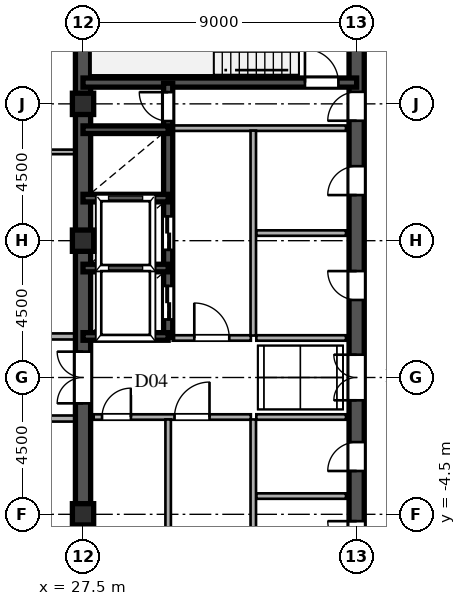
"""IFC4 building model, lengths in metres.
Left out: names, types, materials, properties, quantities, classifications, styles, units other than length and angle.
Written with IfcOpenShell. Run it as: python <this file> out.ifc"""

import sys

from ifc_helpers import new_model, si_unit, direction, frame, frame_2d, origin, origin_2d, place, context, subcontext, project, spatial, rectangle, hollow_rectangle, extrude, source, transform, mapped, element, fill, save


model = new_model("IFC4")
c1 = context("Model", 3, precision=1e-05, world=origin(), true_north=direction((0.0, 1.0)))
c2 = subcontext(c1, "Body", "Model", "MODEL_VIEW")
j1 = project(units=[si_unit("LENGTHUNIT", "METRE"), si_unit("PLANEANGLEUNIT", "RADIAN")], contexts=[c1])
p1 = place(None, origin())
s1 = spatial("IfcSite", under=j1, at=p1, CompositionType="ELEMENT")
p2 = place(p1, origin())
s2 = spatial("IfcBuilding", under=s1, at=p2, CompositionType="ELEMENT")
p3 = place(p2, frame((0.0, 0.0, 239.4)))
s3 = spatial("IfcBuildingStorey", under=s2, at=p3, CompositionType="ELEMENT", Elevation=239.4)
m1 = source(origin(), c2, "Body", "SweptSolid", [
    extrude(hollow_rectangle(XDim=0.7, YDim=0.7, WallThickness=0.03, at=origin_2d()), origin(), (0.0, 0.0, 1.0), 3.75),
])
for number, where, z_axis, x_axis in (
    (1, (27.5, -4.5, 0.0), (0.0, 0.0, 1.0), (1.0, 0.0, 0.0)),
    (2, (27.5, 4.5, 0.0), (0.0, 0.0, 1.0), (1.0, 0.0, 0.0)),
    (3, (27.5, 9.0, 0.0), (0.0, 0.0, 1.0), (1.0, 0.0, 0.0)),
):
    element("IfcColumn", number, at=place(p3, frame(where, z_axis=z_axis, x_axis=x_axis)), inside=s3, PredefinedType="COLUMN", context=c2, shape_type="MappedRepresentation", body=[
        mapped(m1, transform((0.0, 0.0, 0.0), scale=1.0)),
    ])
for number, where, z_axis, x_axis in (
    (4, (27.5, -13.5, 0.0), (0.0, 0.0, 1.0), (0.0, 1.0, 0.0)),
    (5, (27.5, 1.3, 0.0), (0.0, 0.0, 1.0), (0.0, 1.0, 0.0)),
):
    element("IfcWall", number, at=place(p3, frame(where, z_axis=z_axis, x_axis=x_axis)), inside=s3, PredefinedType="SHEAR", context=c2, shape_type="SweptSolid", body=[
        extrude(rectangle(XDim=12.2, YDim=0.5, at=frame_2d((6.1, 0.0))), origin(), (0.0, 0.0, 1.0), 3.53),
    ])
p4 = place(p3, frame((27.5, -1.3, 0.0), z_axis=(0.0, 0.0, 1.0), x_axis=(0.0, 1.0, 0.0)))
e6 = element("IfcWall", 6, at=p4, inside=s3, PredefinedType="SHEAR", context=c2, shape_type="SweptSolid", body=[
    extrude(rectangle(XDim=2.6, YDim=0.5, at=frame_2d((1.3, 0.0))), origin(), (0.0, 0.0, 1.0), 3.53),
])
p5 = place(p4, frame((0.45, 0.0, 0.0)))
e7 = element("IfcOpeningElement", 7, at=p5, cuts=e6, PredefinedType="OPENING", context=c2, shape_type="SweptSolid", body=[
    extrude(rectangle(XDim=1.7, YDim=2.35, at=frame_2d((0.85, 1.175))), frame((0.0, 0.26, 0.0), z_axis=(0.0, -1.0, 0.0), x_axis=(1.0, 0.0, 0.0)), (0.0, 0.0, 1.0), 0.52),
])
p6 = place(p3, frame((36.5, -1.3, 0.0), z_axis=(0.0, 0.0, 1.0), x_axis=(0.0, 1.0, 0.0)))
e8 = element("IfcWall", 8, at=p6, inside=s3, PredefinedType="SHEAR", context=c2, shape_type="SweptSolid", body=[
    extrude(rectangle(XDim=2.6, YDim=0.5, at=frame_2d((1.3, 0.0))), origin(), (0.0, 0.0, 1.0), 3.53),
])
p7 = place(p6, frame((0.55, 0.0, 0.0)))
e9 = element("IfcOpeningElement", 9, at=p7, cuts=e8, PredefinedType="OPENING", context=c2, shape_type="SweptSolid", body=[
    extrude(rectangle(XDim=1.5, YDim=2.3, at=frame_2d((0.75, 1.15))), frame((0.0, 0.26, 0.0), z_axis=(0.0, -1.0, 0.0), x_axis=(1.0, 0.0, 0.0)), (0.0, 0.0, 1.0), 0.52),
])
p8 = place(p3, frame((36.5, 8.2, 0.0), z_axis=(0.0, 0.0, 1.0), x_axis=(0.0, 1.0, 0.0)))
e10 = element("IfcWall", 10, at=p8, inside=s3, PredefinedType="SHEAR", context=c2, shape_type="SweptSolid", body=[
    extrude(rectangle(XDim=5.45, YDim=0.5, at=frame_2d((2.725, 0.0))), origin(), (0.0, 0.0, 1.0), 3.53),
])
p9 = place(p8, frame((0.245, 0.0, 0.0)))
e11 = element("IfcOpeningElement", 11, at=p9, cuts=e10, PredefinedType="OPENING", context=c2, shape_type="SweptSolid", body=[
    extrude(rectangle(XDim=0.95, YDim=2.15, at=frame_2d((0.475, 1.075))), frame((0.0, 0.26, 0.0), z_axis=(0.0, -1.0, 0.0), x_axis=(1.0, 0.0, 0.0)), (0.0, 0.0, 1.0), 0.52),
])
p10 = place(p3, frame((36.5, -6.5, 0.0), z_axis=(0.0, 0.0, 1.0), x_axis=(0.0, 1.0, 0.0)))
e12 = element("IfcWall", 12, at=p10, inside=s3, PredefinedType="SHEAR", context=c2, shape_type="SweptSolid", body=[
    extrude(rectangle(XDim=2.6, YDim=0.5, at=frame_2d((1.3, 0.0))), origin(), (0.0, 0.0, 1.0), 3.53),
])
p11 = place(p10, frame((0.825, 0.0, 0.0)))
e13 = element("IfcOpeningElement", 13, at=p11, cuts=e12, PredefinedType="OPENING", context=c2, shape_type="SweptSolid", body=[
    extrude(rectangle(XDim=0.95, YDim=2.15, at=frame_2d((0.475, 1.075))), frame((0.0, 0.26, 0.0), z_axis=(0.0, -1.0, 0.0), x_axis=(1.0, 0.0, 0.0)), (0.0, 0.0, 1.0), 0.52),
])
p12 = place(p3, frame((36.5, -3.9, 0.0), z_axis=(0.0, 0.0, 1.0), x_axis=(0.0, 1.0, 0.0)))
e14 = element("IfcWall", 14, at=p12, inside=s3, PredefinedType="SHEAR", context=c2, shape_type="SweptSolid", body=[
    extrude(rectangle(XDim=2.6, YDim=0.5, at=frame_2d((1.3, 0.0))), origin(), (0.0, 0.0, 1.0), 3.53),
])
p13 = place(p12, frame((0.825, 0.0, 0.0)))
e15 = element("IfcOpeningElement", 15, at=p13, cuts=e14, PredefinedType="OPENING", context=c2, shape_type="SweptSolid", body=[
    extrude(rectangle(XDim=0.95, YDim=2.15, at=frame_2d((0.475, 1.075))), frame((0.0, 0.26, 0.0), z_axis=(0.0, -1.0, 0.0), x_axis=(1.0, 0.0, 0.0)), (0.0, 0.0, 1.0), 0.52),
])
p14 = place(p3, frame((36.5, 1.3, 0.0), z_axis=(0.0, 0.0, 1.0), x_axis=(0.0, 1.0, 0.0)))
e16 = element("IfcWall", 16, at=p14, inside=s3, PredefinedType="SHEAR", context=c2, shape_type="SweptSolid", body=[
    extrude(rectangle(XDim=3.45, YDim=0.5, at=frame_2d((1.725, 0.0))), origin(), (0.0, 0.0, 1.0), 3.53),
])
p15 = place(p14, frame((1.25, 0.0, 0.0)))
e17 = element("IfcOpeningElement", 17, at=p15, cuts=e16, PredefinedType="OPENING", context=c2, shape_type="SweptSolid", body=[
    extrude(rectangle(XDim=0.95, YDim=2.15, at=frame_2d((0.475, 1.075))), frame((0.0, 0.26, 0.0), z_axis=(0.0, -1.0, 0.0), x_axis=(1.0, 0.0, 0.0)), (0.0, 0.0, 1.0), 0.52),
])
p16 = place(p3, frame((36.5, 4.75, 0.0), z_axis=(0.0, 0.0, 1.0), x_axis=(0.0, 1.0, 0.0)))
e18 = element("IfcWall", 18, at=p16, inside=s3, PredefinedType="SHEAR", context=c2, shape_type="SweptSolid", body=[
    extrude(rectangle(XDim=3.45, YDim=0.5, at=frame_2d((1.725, 0.0))), origin(), (0.0, 0.0, 1.0), 3.53),
])
p17 = place(p16, frame((1.25, 0.0, 0.0)))
e19 = element("IfcOpeningElement", 19, at=p17, cuts=e18, PredefinedType="OPENING", context=c2, shape_type="SweptSolid", body=[
    extrude(rectangle(XDim=0.95, YDim=2.15, at=frame_2d((0.475, 1.075))), frame((0.0, 0.26, 0.0), z_axis=(0.0, -1.0, 0.0), x_axis=(1.0, 0.0, 0.0)), (0.0, 0.0, 1.0), 0.52),
])
p18 = place(p3, frame((27.5, 9.7, 0.0), z_axis=(0.0, 0.0, 1.0), x_axis=(1.0, 0.0, 0.0)))
e20 = element("IfcWall", 20, at=p18, inside=s3, PredefinedType="SHEAR", context=c2, shape_type="SweptSolid", body=[
    extrude(rectangle(XDim=9.0, YDim=0.3, at=frame_2d((4.5, 0.0))), origin(), (0.0, 0.0, 1.0), 3.53),
])
p19 = place(p18, frame((7.3, 0.0, 0.0)))
e21 = element("IfcOpeningElement", 21, at=p19, cuts=e20, PredefinedType="OPENING", context=c2, shape_type="SweptSolid", body=[
    extrude(rectangle(XDim=1.1, YDim=2.2, at=frame_2d((0.55, 1.1))), frame((0.0, 0.16, 0.0), z_axis=(0.0, -1.0, 0.0), x_axis=(1.0, 0.0, 0.0)), (0.0, 0.0, 1.0), 0.32),
])
for number, where, z_axis, x_axis in (
    (22, (27.5, 1.35, 0.0), (0.0, 0.0, 1.0), (1.0, 0.0, 0.0)),
    (23, (27.5, 3.6, 0.0), (0.0, 0.0, 1.0), (1.0, 0.0, 0.0)),
    (24, (27.5, 5.9, 0.0), (0.0, 0.0, 1.0), (1.0, 0.0, 0.0)),
    (25, (27.5, 8.15, 0.0), (0.0, 0.0, 1.0), (1.0, 0.0, 0.0)),
):
    element("IfcWall", number, at=place(p3, frame(where, z_axis=z_axis, x_axis=x_axis)), inside=s3, PredefinedType="SHEAR", context=c2, shape_type="SweptSolid", body=[
        extrude(rectangle(XDim=2.8, YDim=0.25, at=frame_2d((1.4, 0.0))), origin(), (0.0, 0.0, 1.0), 3.53),
    ])
p20 = place(p3, frame((30.3, 1.32, 0.0), z_axis=(0.0, 0.0, 1.0), x_axis=(0.0, 1.0, 0.0)))
e26 = element("IfcWall", 26, at=p20, inside=s3, PredefinedType="SHEAR", context=c2, shape_type="SweptSolid", body=[
    extrude(rectangle(XDim=2.28, YDim=0.3, at=frame_2d((1.14, 0.0))), origin(), (0.0, 0.0, 1.0), 3.53),
])
p21 = place(p20, frame((0.59, 0.0, 0.0)))
e27 = element("IfcOpeningElement", 27, at=p21, cuts=e26, PredefinedType="OPENING", context=c2, shape_type="SweptSolid", body=[
    extrude(rectangle(XDim=1.1, YDim=2.2, at=frame_2d((0.55, 1.1))), frame((0.0, 0.16, 0.0), z_axis=(0.0, -1.0, 0.0), x_axis=(1.0, 0.0, 0.0)), (0.0, 0.0, 1.0), 0.32),
])
p22 = place(p3, frame((30.3, 3.6, 0.0), z_axis=(0.0, 0.0, 1.0), x_axis=(0.0, 1.0, 0.0)))
e28 = element("IfcWall", 28, at=p22, inside=s3, PredefinedType="SHEAR", context=c2, shape_type="SweptSolid", body=[
    extrude(rectangle(XDim=2.3, YDim=0.3, at=frame_2d((1.15, 0.0))), origin(), (0.0, 0.0, 1.0), 3.53),
])
p23 = place(p22, frame((0.6, 0.0, 0.0)))
e29 = element("IfcOpeningElement", 29, at=p23, cuts=e28, PredefinedType="OPENING", context=c2, shape_type="SweptSolid", body=[
    extrude(rectangle(XDim=1.1, YDim=2.2, at=frame_2d((0.55, 1.1))), frame((0.0, 0.16, 0.0), z_axis=(0.0, -1.0, 0.0), x_axis=(1.0, 0.0, 0.0)), (0.0, 0.0, 1.0), 0.32),
])
p24 = place(p3, frame((30.3, 5.9, 0.0), z_axis=(0.0, 0.0, 1.0), x_axis=(0.0, 1.0, 0.0)))
e30 = element("IfcWall", 30, at=p24, inside=s3, PredefinedType="SHEAR", context=c2, shape_type="SweptSolid", body=[
    extrude(rectangle(XDim=2.25, YDim=0.3, at=frame_2d((1.125, 0.0))), origin(), (0.0, 0.0, 1.0), 3.53),
])
p25 = place(p3, frame((30.3, 8.15, 0.0), z_axis=(0.0, 0.0, 1.0), x_axis=(0.0, 1.0, 0.0)))
e31 = element("IfcWall", 31, at=p25, inside=s3, PredefinedType="SHEAR", context=c2, shape_type="SweptSolid", body=[
    extrude(rectangle(XDim=1.53, YDim=0.3, at=frame_2d((0.765, 0.0))), origin(), (0.0, 0.0, 1.0), 3.53),
])
p26 = place(p25, frame((0.285, 0.0, 0.0)))
e32 = element("IfcOpeningElement", 32, at=p26, cuts=e31, PredefinedType="OPENING", context=c2, shape_type="SweptSolid", body=[
    extrude(rectangle(XDim=0.95, YDim=2.15, at=frame_2d((0.475, 1.075))), frame((0.0, 0.16, 0.0), z_axis=(0.0, -1.0, 0.0), x_axis=(1.0, 0.0, 0.0)), (0.0, 0.0, 1.0), 0.32),
])
p27 = place(p3, frame((30.45, 8.2, 0.0), z_axis=(0.0, 0.0, 1.0), x_axis=(1.0, 0.0, 0.0)))
e33 = element("IfcWall", 33, at=p27, inside=s3, PredefinedType="PARTITIONING", context=c2, shape_type="SweptSolid", body=[
    extrude(rectangle(XDim=5.7, YDim=0.18, at=frame_2d((2.85, 0.0))), origin(), (0.0, 0.0, 1.0), 3.53),
])
p28 = place(p3, frame((33.1, -6.42, 0.0), z_axis=(0.0, 0.0, 1.0), x_axis=(0.0, 1.0, 0.0)))
e34 = element("IfcWall", 34, at=p28, inside=s3, PredefinedType="PARTITIONING", context=c2, shape_type="SweptSolid", body=[
    extrude(rectangle(XDim=5.04, YDim=0.18, at=frame_2d((2.52, 0.0))), origin(), (0.0, 0.0, 1.0), 3.53),
])
p29 = place(p3, frame((33.1, 1.38, 0.0), z_axis=(0.0, 0.0, 1.0), x_axis=(0.0, 1.0, 0.0)))
e35 = element("IfcWall", 35, at=p29, inside=s3, PredefinedType="PARTITIONING", context=c2, shape_type="SweptSolid", body=[
    extrude(rectangle(XDim=6.74, YDim=0.18, at=frame_2d((3.37, 0.0))), origin(), (0.0, 0.0, 1.0), 3.53),
])
p30 = place(p3, frame((27.85, -1.3, 0.0), z_axis=(0.0, 0.0, 1.0), x_axis=(1.0, 0.0, 0.0)))
e36 = element("IfcWall", 36, at=p30, inside=s3, PredefinedType="PARTITIONING", context=c2, shape_type="SweptSolid", body=[
    extrude(rectangle(XDim=2.45, YDim=0.18, at=frame_2d((1.225, 0.0))), origin(), (0.0, 0.0, 1.0), 3.53),
])
p31 = place(p30, frame((0.275, 0.0, 0.0)))
e37 = element("IfcOpeningElement", 37, at=p31, cuts=e36, PredefinedType="OPENING", context=c2, shape_type="SweptSolid", body=[
    extrude(rectangle(XDim=0.95, YDim=2.15, at=frame_2d((0.475, 1.075))), frame((0.0, 0.1, 0.0), z_axis=(0.0, -1.0, 0.0), x_axis=(1.0, 0.0, 0.0)), (0.0, 0.0, 1.0), 0.2),
])
p32 = place(p3, frame((30.3, -1.3, 0.0), z_axis=(0.0, 0.0, 1.0), x_axis=(1.0, 0.0, 0.0)))
e38 = element("IfcWall", 38, at=p32, inside=s3, PredefinedType="PARTITIONING", context=c2, shape_type="SweptSolid", body=[
    extrude(rectangle(XDim=2.72, YDim=0.18, at=frame_2d((1.36, 0.0))), origin(), (0.0, 0.0, 1.0), 3.53),
])
p33 = place(p32, frame((0.21, 0.0, 0.0)))
e39 = element("IfcOpeningElement", 39, at=p33, cuts=e38, PredefinedType="OPENING", context=c2, shape_type="SweptSolid", body=[
    extrude(rectangle(XDim=1.15, YDim=2.2, at=frame_2d((0.575, 1.1))), frame((0.0, 0.1, 0.0), z_axis=(0.0, -1.0, 0.0), x_axis=(1.0, 0.0, 0.0)), (0.0, 0.0, 1.0), 0.2),
])
p34 = place(p3, frame((30.3, -7.12, 0.0), z_axis=(0.0, 0.0, 1.0), x_axis=(0.0, 1.0, 0.0)))
e40 = element("IfcWall", 40, at=p34, inside=s3, PredefinedType="PARTITIONING", context=c2, shape_type="SweptSolid", body=[
    extrude(rectangle(XDim=5.74, YDim=0.18, at=frame_2d((2.87, 0.0))), origin(), (0.0, 0.0, 1.0), 3.53),
])
p35 = place(p3, frame((30.45, 1.3, 0.0), z_axis=(0.0, 0.0, 1.0), x_axis=(1.0, 0.0, 0.0)))
e41 = element("IfcWall", 41, at=p35, inside=s3, PredefinedType="PARTITIONING", context=c2, shape_type="SweptSolid", body=[
    extrude(rectangle(XDim=2.57, YDim=0.18, at=frame_2d((1.285, 0.0))), origin(), (0.0, 0.0, 1.0), 3.53),
])
p36 = place(p35, frame((0.71, 0.0, 0.0)))
e42 = element("IfcOpeningElement", 42, at=p36, cuts=e41, PredefinedType="OPENING", context=c2, shape_type="SweptSolid", body=[
    extrude(rectangle(XDim=1.15, YDim=2.2, at=frame_2d((0.575, 1.1))), frame((0.0, 0.1, 0.0), z_axis=(0.0, -1.0, 0.0), x_axis=(1.0, 0.0, 0.0)), (0.0, 0.0, 1.0), 0.2),
])
for number, where, z_axis, x_axis in (
    (43, (33.2, -1.3, 0.0), (0.0, 0.0, 1.0), (1.0, 0.0, 0.0)),
    (44, (33.2, 1.3, 0.0), (0.0, 0.0, 1.0), (1.0, 0.0, 0.0)),
    (45, (33.2, -3.9, 0.0), (0.0, 0.0, 1.0), (1.0, 0.0, 0.0)),
    (46, (33.2, 4.75, 0.0), (0.0, 0.0, 1.0), (1.0, 0.0, 0.0)),
):
    element("IfcWall", number, at=place(p3, frame(where, z_axis=z_axis, x_axis=x_axis)), inside=s3, PredefinedType="PARTITIONING", context=c2, shape_type="SweptSolid", body=[
        extrude(rectangle(XDim=2.95, YDim=0.18, at=frame_2d((1.475, 0.0))), origin(), (0.0, 0.0, 1.0), 3.53),
    ])
p37 = place(p3, frame((-27.245, -1.35, 0.0), z_axis=(0.0, 0.0, 1.0), x_axis=(1.0, 0.0, 0.0)))
e47 = element("IfcWall", 47, at=p37, inside=s3, PredefinedType="PARTITIONING", context=c2, shape_type="SweptSolid", body=[
    extrude(rectangle(XDim=54.49, YDim=0.2, at=frame_2d((27.245, 0.0))), origin(), (0.0, 0.0, 1.0), 3.53),
])
p38 = place(p37, frame((23.47, 0.0, 0.0)))
e48 = element("IfcOpeningElement", 48, at=p38, cuts=e47, PredefinedType="OPENING", context=c2, shape_type="SweptSolid", body=[
    extrude(rectangle(XDim=1.05, YDim=2.25, at=frame_2d((0.525, 1.125))), frame((0.0, 0.11, 0.0), z_axis=(0.0, -1.0, 0.0), x_axis=(1.0, 0.0, 0.0)), (0.0, 0.0, 1.0), 0.22),
])
p39 = place(p3, frame((-27.245, 1.35, 0.0), z_axis=(0.0, 0.0, 1.0), x_axis=(1.0, 0.0, 0.0)))
e49 = element("IfcWall", 49, at=p39, inside=s3, PredefinedType="PARTITIONING", context=c2, shape_type="SweptSolid", body=[
    extrude(rectangle(XDim=54.49, YDim=0.2, at=frame_2d((27.245, 0.0))), origin(), (0.0, 0.0, 1.0), 3.53),
])
p40 = place(p39, frame((23.47, 0.0, 0.0)))
e50 = element("IfcOpeningElement", 50, at=p40, cuts=e49, PredefinedType="OPENING", context=c2, shape_type="SweptSolid", body=[
    extrude(rectangle(XDim=1.05, YDim=2.25, at=frame_2d((0.525, 1.125))), frame((0.0, 0.11, 0.0), z_axis=(0.0, -1.0, 0.0), x_axis=(1.0, 0.0, 0.0)), (0.0, 0.0, 1.0), 0.22),
])
p41 = place(p3, frame((5.585, 7.42, 0.0), z_axis=(0.0, 0.0, 1.0), x_axis=(1.0, 0.0, 0.0)))
e51 = element("IfcWall", 51, at=p41, inside=s3, PredefinedType="PARTITIONING", context=c2, shape_type="SweptSolid", body=[
    extrude(rectangle(XDim=21.66, YDim=0.15, at=frame_2d((10.83, 0.0))), origin(), (0.0, 0.0, 1.0), 3.53),
])
p42 = place(p41, frame((3.94, 0.0, 0.0)))
e52 = element("IfcOpeningElement", 52, at=p42, cuts=e51, PredefinedType="OPENING", context=c2, shape_type="SweptSolid", body=[
    extrude(rectangle(XDim=0.95, YDim=2.15, at=frame_2d((0.475, 1.075))), frame((0.0, 0.085, 0.0), z_axis=(0.0, -1.0, 0.0), x_axis=(1.0, 0.0, 0.0)), (0.0, 0.0, 1.0), 0.17),
])
p43 = place(p41, frame((11.69, 0.0, 0.0)))
e53 = element("IfcOpeningElement", 53, at=p43, cuts=e51, PredefinedType="OPENING", context=c2, shape_type="SweptSolid", body=[
    extrude(rectangle(XDim=0.95, YDim=2.15, at=frame_2d((0.475, 1.075))), frame((0.0, 0.085, 0.0), z_axis=(0.0, -1.0, 0.0), x_axis=(1.0, 0.0, 0.0)), (0.0, 0.0, 1.0), 0.17),
])
p44 = place(p41, frame((18.19, 0.0, 0.0)))
e54 = element("IfcOpeningElement", 54, at=p44, cuts=e51, PredefinedType="OPENING", context=c2, shape_type="SweptSolid", body=[
    extrude(rectangle(XDim=0.95, YDim=2.15, at=frame_2d((0.475, 1.075))), frame((0.0, 0.085, 0.0), z_axis=(0.0, -1.0, 0.0), x_axis=(1.0, 0.0, 0.0)), (0.0, 0.0, 1.0), 0.17),
])
m2 = source(origin(), c2, "Body", "SweptSolid", [
    extrude(rectangle(XDim=1.7, YDim=2.35, at=frame_2d((0.85, 1.175))), frame((0.0, 0.025, 0.0), z_axis=(0.0, -1.0, 0.0), x_axis=(1.0, 0.0, 0.0)), (0.0, 0.0, 1.0), 0.05),
])
p45 = place(p5, origin())
e55 = element("IfcDoor", 55, at=p45, inside=s3, OperationType="DOUBLE_SWING_LEFT", PredefinedType="DOOR", context=c2, shape_type="MappedRepresentation", body=[
    mapped(m2, transform((0.0, 0.0, 0.0), scale=1.0)),
])
fill(e7, e55)
m3 = source(origin(), c2, "Body", "SweptSolid", [
    extrude(rectangle(XDim=1.5, YDim=2.3, at=frame_2d((0.75, 1.15))), frame((0.0, 0.025, 0.0), z_axis=(0.0, -1.0, 0.0), x_axis=(1.0, 0.0, 0.0)), (0.0, 0.0, 1.0), 0.05),
])
p46 = place(p7, origin())
e56 = element("IfcDoor", 56, at=p46, inside=s3, OperationType="DOUBLE_SWING_LEFT", PredefinedType="DOOR", context=c2, shape_type="MappedRepresentation", body=[
    mapped(m3, transform((0.0, 0.0, 0.0), scale=1.0)),
])
fill(e9, e56)
m4 = source(origin(), c2, "Body", "SweptSolid", [
    extrude(rectangle(XDim=0.95, YDim=2.15, at=frame_2d((0.475, 1.075))), frame((0.0, 0.025, 0.0), z_axis=(0.0, -1.0, 0.0), x_axis=(1.0, 0.0, 0.0)), (0.0, 0.0, 1.0), 0.05),
])
p47 = place(p9, origin())
e57 = element("IfcDoor", 57, at=p47, inside=s3, OperationType="SINGLE_SWING_LEFT", PredefinedType="DOOR", context=c2, shape_type="MappedRepresentation", body=[
    mapped(m4, transform((0.0, 0.0, 0.0), scale=1.0)),
])
fill(e11, e57)
p48 = place(p11, origin())
e58 = element("IfcDoor", 58, at=p48, inside=s3, OperationType="SINGLE_SWING_RIGHT", PredefinedType="DOOR", context=c2, shape_type="MappedRepresentation", body=[
    mapped(m4, transform((0.0, 0.0, 0.0), scale=1.0)),
])
fill(e13, e58)
p49 = place(p13, origin())
e59 = element("IfcDoor", 59, at=p49, inside=s3, OperationType="SINGLE_SWING_LEFT", PredefinedType="DOOR", context=c2, shape_type="MappedRepresentation", body=[
    mapped(m4, transform((0.0, 0.0, 0.0), scale=1.0)),
])
fill(e15, e59)
p50 = place(p15, origin())
e60 = element("IfcDoor", 60, at=p50, inside=s3, OperationType="SINGLE_SWING_RIGHT", PredefinedType="DOOR", context=c2, shape_type="MappedRepresentation", body=[
    mapped(m4, transform((0.0, 0.0, 0.0), scale=1.0)),
])
fill(e17, e60)
p51 = place(p17, origin())
e61 = element("IfcDoor", 61, at=p51, inside=s3, OperationType="SINGLE_SWING_LEFT", PredefinedType="DOOR", context=c2, shape_type="MappedRepresentation", body=[
    mapped(m4, transform((0.0, 0.0, 0.0), scale=1.0)),
])
fill(e19, e61)
m5 = source(origin(), c2, "Body", "SweptSolid", [
    extrude(rectangle(XDim=1.1, YDim=2.2, at=frame_2d((0.55, 1.1))), frame((0.0, 0.025, 0.0), z_axis=(0.0, -1.0, 0.0), x_axis=(1.0, 0.0, 0.0)), (0.0, 0.0, 1.0), 0.05),
])
p52 = place(p19, origin())
e62 = element("IfcDoor", 62, at=p52, inside=s3, OperationType="SINGLE_SWING_LEFT", PredefinedType="DOOR", context=c2, shape_type="MappedRepresentation", body=[
    mapped(m5, transform((0.0, 0.0, 0.0), scale=1.0)),
])
fill(e21, e62)
m6 = source(origin(), c2, "Body", "SweptSolid", [
    extrude(rectangle(XDim=1.1, YDim=2.2, at=frame_2d((0.55, 1.1))), frame((0.0, 0.025, 0.0), z_axis=(0.0, -1.0, 0.0), x_axis=(1.0, 0.0, 0.0)), (0.0, 0.0, 1.0), 0.05),
])
p53 = place(p21, origin())
e63 = element("IfcDoor", 63, at=p53, inside=s3, OperationType="DOUBLE_DOOR_SLIDING", PredefinedType="DOOR", context=c2, shape_type="MappedRepresentation", body=[
    mapped(m6, transform((0.0, 0.0, 0.0), scale=1.0)),
])
fill(e27, e63)
p54 = place(p23, origin())
e64 = element("IfcDoor", 64, at=p54, inside=s3, OperationType="DOUBLE_DOOR_SLIDING", PredefinedType="DOOR", context=c2, shape_type="MappedRepresentation", body=[
    mapped(m6, transform((0.0, 0.0, 0.0), scale=1.0)),
])
fill(e29, e64)
p55 = place(p26, origin())
e65 = element("IfcDoor", 65, at=p55, inside=s3, OperationType="SINGLE_SWING_RIGHT", PredefinedType="DOOR", context=c2, shape_type="MappedRepresentation", body=[
    mapped(m4, transform((0.0, 0.0, 0.0), scale=1.0)),
])
fill(e32, e65)
p56 = place(p31, origin())
e66 = element("IfcDoor", 66, at=p56, inside=s3, OperationType="SINGLE_SWING_RIGHT", PredefinedType="DOOR", context=c2, shape_type="MappedRepresentation", body=[
    mapped(m4, transform((0.0, 0.0, 0.0), scale=1.0)),
])
fill(e37, e66)
m7 = source(origin(), c2, "Body", "SweptSolid", [
    extrude(rectangle(XDim=1.15, YDim=2.2, at=frame_2d((0.575, 1.1))), frame((0.0, 0.025, 0.0), z_axis=(0.0, -1.0, 0.0), x_axis=(1.0, 0.0, 0.0)), (0.0, 0.0, 1.0), 0.05),
])
p57 = place(p33, origin())
e67 = element("IfcDoor", 67, at=p57, inside=s3, OperationType="SINGLE_SWING_RIGHT", PredefinedType="DOOR", context=c2, shape_type="MappedRepresentation", body=[
    mapped(m7, transform((0.0, 0.0, 0.0), scale=1.0)),
])
fill(e39, e67)
p58 = place(p36, origin())
e68 = element("IfcDoor", 68, at=p58, inside=s3, OperationType="SINGLE_SWING_LEFT", PredefinedType="DOOR", context=c2, shape_type="MappedRepresentation", body=[
    mapped(m7, transform((0.0, 0.0, 0.0), scale=1.0)),
])
fill(e42, e68)
save(model, sys.argv[1])
